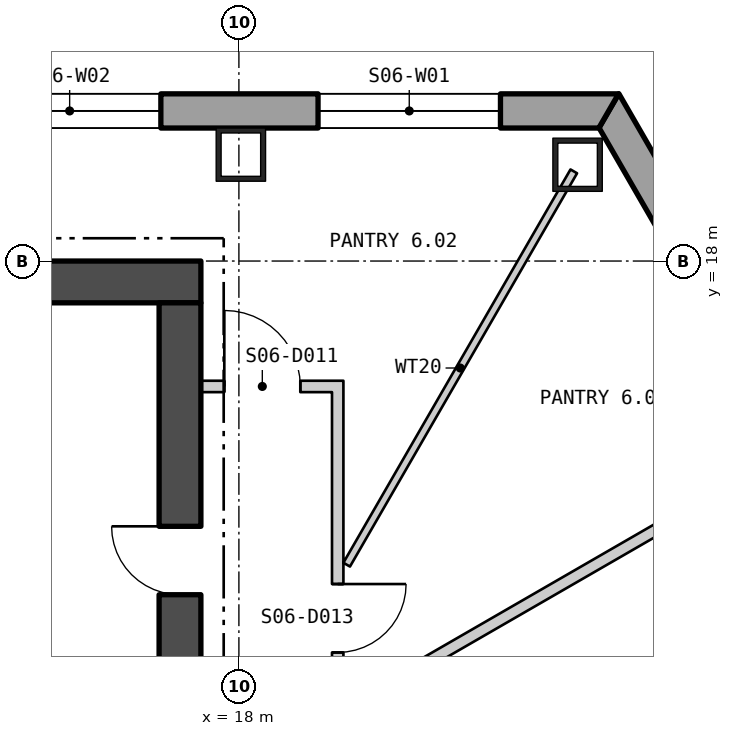
"""IFC4 building model, lengths in metres.
Left out: names, types, materials, properties, quantities, classifications, styles, units other than length and angle.
Written with IfcOpenShell. Run it as: python <this file> out.ifc"""

import sys

from ifc_helpers import new_model, si_unit, direction, frame, frame_2d, origin, origin_2d, place, context, subcontext, project, spatial, polyline, rectangle, hollow_rectangle, outline, extrude, element, fill, save


model = new_model("IFC4")
c1 = context("Model", 3, precision=1e-05, world=origin(), true_north=direction((0.0, 1.0)))
c2 = subcontext(c1, "Body", "Model", "MODEL_VIEW")
j1 = project(units=[si_unit("LENGTHUNIT", "METRE"), si_unit("PLANEANGLEUNIT", "RADIAN")], contexts=[c1])
p1 = place(None, origin())
s1 = spatial("IfcSite", under=j1, at=p1, CompositionType="ELEMENT")
p2 = place(p1, origin())
s2 = spatial("IfcBuilding", under=s1, at=p2, CompositionType="ELEMENT")
p3 = place(p2, frame((0.0, 0.0, 84.3)))
s3 = spatial("IfcBuildingStorey", under=s2, at=p3, CompositionType="ELEMENT", Elevation=84.3)
for number, where, z_axis, x_axis in (
    (1, (22.456, 19.267, 0.0), (0.0, 0.0, 1.0), (-1.0, 0.0, 0.0)),
    (2, (18.026, 19.4, 0.0), (0.0, 0.0, 1.0), (-1.0, 0.0, 0.0)),
):
    element("IfcColumn", number, at=place(p3, frame(where, z_axis=z_axis, x_axis=x_axis)), inside=s3, PredefinedType="COLUMN", context=c2, shape_type="SweptSolid", body=[
        extrude(hollow_rectangle(XDim=0.65, YDim=0.7, WallThickness=0.065, at=origin_2d()), origin(), (0.0, 0.0, 1.0), 4.5),
    ])
p4 = place(p3, frame((22.865, 19.975, -0.4), z_axis=(0.0, 0.0, 1.0), x_axis=(-1.0, 0.0, 0.0)))
e3 = element("IfcWall", 3, at=p4, inside=s3, PredefinedType="SOLIDWALL", context=c2, shape_type="SweptSolid", body=[
    extrude(outline(polyline([(-0.13, -0.225), (45.86, -0.225), (45.6, 0.225), (0.13, 0.225), (-0.13, -0.225)])), origin(), (0.0, 0.0, 1.0), 4.5),
])
p5 = place(p4, frame((1.424, 0.0, 1.3)))
e4 = element("IfcOpeningElement", 4, at=p5, cuts=e3, PredefinedType="OPENING", context=c2, shape_type="SweptSolid", body=[
    extrude(rectangle(XDim=2.4, YDim=2.6, at=frame_2d((1.2, 1.3))), frame((0.0, 0.235, 0.0), z_axis=(0.0, -1.0, 0.0), x_axis=(1.0, 0.0, 0.0)), (0.0, 0.0, 1.0), 0.47),
])
p6 = place(p4, frame((5.892, 0.0, 1.3)))
e5 = element("IfcOpeningElement", 5, at=p6, cuts=e3, PredefinedType="OPENING", context=c2, shape_type="SweptSolid", body=[
    extrude(rectangle(XDim=2.4, YDim=2.6, at=frame_2d((1.2, 1.3))), frame((0.0, 0.235, 0.0), z_axis=(0.0, -1.0, 0.0), x_axis=(1.0, 0.0, 0.0)), (0.0, 0.0, 1.0), 0.47),
])
p7 = place(p4, frame((10.399, 0.0, 1.3)))
e6 = element("IfcOpeningElement", 6, at=p7, cuts=e3, PredefinedType="OPENING", context=c2, shape_type="SweptSolid", body=[
    extrude(rectangle(XDim=2.4, YDim=2.6, at=frame_2d((1.2, 1.3))), frame((0.0, 0.235, 0.0), z_axis=(0.0, -1.0, 0.0), x_axis=(1.0, 0.0, 0.0)), (0.0, 0.0, 1.0), 0.47),
])
p8 = place(p4, frame((14.905, 0.0, 1.3)))
e7 = element("IfcOpeningElement", 7, at=p8, cuts=e3, PredefinedType="OPENING", context=c2, shape_type="SweptSolid", body=[
    extrude(rectangle(XDim=2.4, YDim=2.6, at=frame_2d((1.2, 1.3))), frame((0.0, 0.235, 0.0), z_axis=(0.0, -1.0, 0.0), x_axis=(1.0, 0.0, 0.0)), (0.0, 0.0, 1.0), 0.47),
])
p9 = place(p4, frame((19.412, 0.0, 1.3)))
e8 = element("IfcOpeningElement", 8, at=p9, cuts=e3, PredefinedType="OPENING", context=c2, shape_type="SweptSolid", body=[
    extrude(rectangle(XDim=2.4, YDim=2.6, at=frame_2d((1.2, 1.3))), frame((0.0, 0.235, 0.0), z_axis=(0.0, -1.0, 0.0), x_axis=(1.0, 0.0, 0.0)), (0.0, 0.0, 1.0), 0.47),
])
p10 = place(p4, frame((23.918, 0.0, 1.3)))
e9 = element("IfcOpeningElement", 9, at=p10, cuts=e3, PredefinedType="OPENING", context=c2, shape_type="SweptSolid", body=[
    extrude(rectangle(XDim=2.4, YDim=2.6, at=frame_2d((1.2, 1.3))), frame((0.0, 0.235, 0.0), z_axis=(0.0, -1.0, 0.0), x_axis=(1.0, 0.0, 0.0)), (0.0, 0.0, 1.0), 0.47),
])
p11 = place(p4, frame((28.425, 0.0, 1.3)))
e10 = element("IfcOpeningElement", 10, at=p11, cuts=e3, PredefinedType="OPENING", context=c2, shape_type="SweptSolid", body=[
    extrude(rectangle(XDim=2.4, YDim=2.6, at=frame_2d((1.2, 1.3))), frame((0.0, 0.235, 0.0), z_axis=(0.0, -1.0, 0.0), x_axis=(1.0, 0.0, 0.0)), (0.0, 0.0, 1.0), 0.47),
])
p12 = place(p4, frame((32.932, 0.0, 1.3)))
e11 = element("IfcOpeningElement", 11, at=p12, cuts=e3, PredefinedType="OPENING", context=c2, shape_type="SweptSolid", body=[
    extrude(rectangle(XDim=2.4, YDim=2.6, at=frame_2d((1.2, 1.3))), frame((0.0, 0.235, 0.0), z_axis=(0.0, -1.0, 0.0), x_axis=(1.0, 0.0, 0.0)), (0.0, 0.0, 1.0), 0.47),
])
p13 = place(p4, frame((37.438, 0.0, 1.3)))
e12 = element("IfcOpeningElement", 12, at=p13, cuts=e3, PredefinedType="OPENING", context=c2, shape_type="SweptSolid", body=[
    extrude(rectangle(XDim=2.4, YDim=2.6, at=frame_2d((1.2, 1.3))), frame((0.0, 0.235, 0.0), z_axis=(0.0, -1.0, 0.0), x_axis=(1.0, 0.0, 0.0)), (0.0, 0.0, 1.0), 0.47),
])
p14 = place(p4, frame((41.907, 0.0, 1.3)))
e13 = element("IfcOpeningElement", 13, at=p14, cuts=e3, PredefinedType="OPENING", context=c2, shape_type="SweptSolid", body=[
    extrude(rectangle(XDim=2.4, YDim=2.6, at=frame_2d((1.2, 1.3))), frame((0.0, 0.235, 0.0), z_axis=(0.0, -1.0, 0.0), x_axis=(1.0, 0.0, 0.0)), (0.0, 0.0, 1.0), 0.47),
])
p15 = place(p3, frame((27.954, 11.169, -0.4), z_axis=(0.0, 0.0, 1.0), x_axis=(-0.499997937663, 0.866026594472, 0.0)))
e14 = element("IfcWall", 14, at=p15, inside=s3, PredefinedType="SOLIDWALL", context=c2, shape_type="SweptSolid", body=[
    extrude(outline(polyline([(-0.13, -0.225), (10.3, -0.225), (10.04, 0.225), (0.13, 0.225), (-0.13, -0.225)])), origin(), (0.0, 0.0, 1.0), 4.5),
])
p16 = place(p15, frame((1.847, 0.0, 1.3)))
e15 = element("IfcOpeningElement", 15, at=p16, cuts=e14, PredefinedType="OPENING", context=c2, shape_type="SweptSolid", body=[
    extrude(rectangle(XDim=1.8, YDim=2.6, at=frame_2d((0.9, 1.3))), frame((0.0, 0.235, 0.0), z_axis=(0.0, -1.0, 0.0), x_axis=(1.0, 0.0, 0.0)), (0.0, 0.0, 1.0), 0.47),
])
p17 = place(p15, frame((6.523, 0.0, 1.3)))
e16 = element("IfcOpeningElement", 16, at=p17, cuts=e14, PredefinedType="OPENING", context=c2, shape_type="SweptSolid", body=[
    extrude(rectangle(XDim=1.8, YDim=2.6, at=frame_2d((0.9, 1.3))), frame((0.0, 0.235, 0.0), z_axis=(0.0, -1.0, 0.0), x_axis=(1.0, 0.0, 0.0)), (0.0, 0.0, 1.0), 0.47),
])
p18 = place(p3, frame((-17.5, 17.725, 0.0), z_axis=(0.0, 0.0, 1.0), x_axis=(1.0, 0.0, 0.0)))
e17 = element("IfcWall", 17, at=p18, inside=s3, PredefinedType="SHEAR", context=c2, shape_type="SweptSolid", body=[
    extrude(rectangle(XDim=35.0, YDim=0.55, at=frame_2d((17.5, 0.0))), origin(), (0.0, 0.0, 1.0), 4.3),
])
p19 = place(p3, frame((17.225, 0.55, 0.0), z_axis=(0.0, 0.0, 1.0), x_axis=(0.0, 1.0, 0.0)))
e18 = element("IfcWall", 18, at=p19, inside=s3, PredefinedType="SHEAR", context=c2, shape_type="SweptSolid", body=[
    extrude(rectangle(XDim=16.9, YDim=0.55, at=frame_2d((8.45, 0.0))), origin(), (0.0, 0.0, 1.0), 4.3),
])
p20 = place(p19, frame((5.75, 0.0, 0.0)))
e19 = element("IfcOpeningElement", 19, at=p20, cuts=e18, PredefinedType="OPENING", context=c2, shape_type="SweptSolid", body=[
    extrude(rectangle(XDim=1.5, YDim=2.1, at=frame_2d((0.75, 1.05))), frame((0.0, 0.285, 0.0), z_axis=(0.0, -1.0, 0.0), x_axis=(1.0, 0.0, 0.0)), (0.0, 0.0, 1.0), 0.57),
])
p21 = place(p19, frame((1.525, 0.0, 0.0)))
e20 = element("IfcOpeningElement", 20, at=p21, cuts=e18, PredefinedType="OPENING", context=c2, shape_type="SweptSolid", body=[
    extrude(rectangle(XDim=0.9, YDim=2.1, at=frame_2d((0.45, 1.05))), frame((0.0, 0.285, 0.0), z_axis=(0.0, -1.0, 0.0), x_axis=(1.0, 0.0, 0.0)), (0.0, 0.0, 1.0), 0.57),
])
p22 = place(p19, frame((4.4, 0.0, 0.0)))
e21 = element("IfcOpeningElement", 21, at=p22, cuts=e18, PredefinedType="OPENING", context=c2, shape_type="SweptSolid", body=[
    extrude(rectangle(XDim=0.9, YDim=2.1, at=frame_2d((0.45, 1.05))), frame((0.0, 0.285, 0.0), z_axis=(0.0, -1.0, 0.0), x_axis=(1.0, 0.0, 0.0)), (0.0, 0.0, 1.0), 0.57),
])
p23 = place(p19, frame((8.184, 0.0, 0.0)))
e22 = element("IfcOpeningElement", 22, at=p23, cuts=e18, PredefinedType="OPENING", context=c2, shape_type="SweptSolid", body=[
    extrude(rectangle(XDim=1.0, YDim=2.1, at=frame_2d((0.5, 1.05))), frame((0.0, 0.285, 0.0), z_axis=(0.0, -1.0, 0.0), x_axis=(1.0, 0.0, 0.0)), (0.0, 0.0, 1.0), 0.57),
])
p24 = place(p19, frame((13.059, 0.0, 0.0)))
e23 = element("IfcOpeningElement", 23, at=p24, cuts=e18, PredefinedType="OPENING", context=c2, shape_type="SweptSolid", body=[
    extrude(rectangle(XDim=0.9, YDim=2.1, at=frame_2d((0.45, 1.05))), frame((0.0, 0.285, 0.0), z_axis=(0.0, -1.0, 0.0), x_axis=(1.0, 0.0, 0.0)), (0.0, 0.0, 1.0), 0.57),
])
p25 = place(p3, frame((17.5, 16.35, 0.0), z_axis=(0.0, 0.0, 1.0), x_axis=(1.0, 0.0, 0.0)))
e24 = element("IfcWall", 24, at=p25, inside=s3, PredefinedType="PARTITIONING", context=c2, shape_type="SweptSolid", body=[
    extrude(rectangle(XDim=1.725, YDim=0.15, at=frame_2d((0.863, 0.0))), origin(), (0.0, 0.0, 1.0), 4.3),
])
p26 = place(p25, frame((0.308, 0.0, 0.0)))
e25 = element("IfcOpeningElement", 25, at=p26, cuts=e24, PredefinedType="OPENING", context=c2, shape_type="SweptSolid", body=[
    extrude(rectangle(XDim=1.0, YDim=2.1, at=frame_2d((0.5, 1.05))), frame((0.0, 0.085, 0.0), z_axis=(0.0, -1.0, 0.0), x_axis=(1.0, 0.0, 0.0)), (0.0, 0.0, 1.0), 0.17),
])
p27 = place(p3, frame((19.3, -1.875, 0.0), z_axis=(0.0, 0.0, 1.0), x_axis=(0.0, 1.0, 0.0)))
e26 = element("IfcWall", 26, at=p27, inside=s3, PredefinedType="PARTITIONING", context=c2, shape_type="SweptSolid", body=[
    extrude(rectangle(XDim=18.3, YDim=0.15, at=frame_2d((9.15, 0.0))), origin(), (0.0, 0.0, 1.0), 4.3),
])
p28 = place(p27, frame((9.958, 0.0, 0.0)))
e27 = element("IfcOpeningElement", 27, at=p28, cuts=e26, PredefinedType="OPENING", context=c2, shape_type="SweptSolid", body=[
    extrude(rectangle(XDim=1.0, YDim=2.1, at=frame_2d((0.5, 1.05))), frame((0.0, 0.085, 0.0), z_axis=(0.0, -1.0, 0.0), x_axis=(1.0, 0.0, 0.0)), (0.0, 0.0, 1.0), 0.17),
])
p29 = place(p27, frame((14.725, 0.0, 0.0)))
e28 = element("IfcOpeningElement", 28, at=p29, cuts=e26, PredefinedType="OPENING", context=c2, shape_type="SweptSolid", body=[
    extrude(rectangle(XDim=0.9, YDim=2.1, at=frame_2d((0.45, 1.05))), frame((0.0, 0.085, 0.0), z_axis=(0.0, -1.0, 0.0), x_axis=(1.0, 0.0, 0.0)), (0.0, 0.0, 1.0), 0.17),
])
p30 = place(p3, frame((19.412, 12.11, 0.0), z_axis=(0.0, 0.0, 1.0), x_axis=(0.866097636026, 0.499874869213, 0.0)))
e29 = element("IfcWall", 29, at=p30, inside=s3, PredefinedType="PARTITIONING", context=c2, shape_type="SweptSolid", body=[
    extrude(rectangle(XDim=6.248, YDim=0.15, at=frame_2d((3.124, 0.0))), origin(), (0.0, 0.0, 1.0), 4.3),
])
p31 = place(p3, frame((19.418, 14.005, 0.0), z_axis=(0.0, 0.0, 1.0), x_axis=(0.500026652407, 0.866010015463, 0.0)))
e30 = element("IfcWall", 30, at=p31, inside=s3, PredefinedType="PARTITIONING", context=c2, shape_type="SweptSolid", body=[
    extrude(rectangle(XDim=5.976, YDim=0.1, at=frame_2d((2.988, 0.0))), origin(), (0.0, 0.0, 1.0), 4.3),
])
p32 = place(p5, origin())
e31 = element("IfcWindow", 31, at=p32, inside=s3, PartitioningType="SINGLE_PANEL", PredefinedType="WINDOW", context=c2, shape_type="SweptSolid", body=[
    extrude(rectangle(XDim=2.4, YDim=2.6, at=frame_2d((1.2, 1.3))), frame((0.0, 0.105, 0.0), z_axis=(0.0, -1.0, 0.0), x_axis=(1.0, 0.0, 0.0)), (0.0, 0.0, 1.0), 0.06),
])
fill(e4, e31)
p33 = place(p6, origin())
e32 = element("IfcWindow", 32, at=p33, inside=s3, PartitioningType="SINGLE_PANEL", PredefinedType="WINDOW", context=c2, shape_type="SweptSolid", body=[
    extrude(rectangle(XDim=2.4, YDim=2.6, at=frame_2d((1.2, 1.3))), frame((0.0, 0.105, 0.0), z_axis=(0.0, -1.0, 0.0), x_axis=(1.0, 0.0, 0.0)), (0.0, 0.0, 1.0), 0.06),
])
fill(e5, e32)
p34 = place(p24, origin())
e33 = element("IfcDoor", 33, at=p34, inside=s3, OperationType="SINGLE_SWING_LEFT", PredefinedType="DOOR", context=c2, shape_type="SweptSolid", body=[
    extrude(rectangle(XDim=0.9, YDim=2.1, at=frame_2d((0.45, 1.05))), frame((0.0, 0.025, 0.0), z_axis=(0.0, -1.0, 0.0), x_axis=(1.0, 0.0, 0.0)), (0.0, 0.0, 1.0), 0.05),
])
fill(e23, e33)
p35 = place(p26, origin())
e34 = element("IfcDoor", 34, at=p35, inside=s3, OperationType="SINGLE_SWING_RIGHT", PredefinedType="DOOR", context=c2, shape_type="SweptSolid", body=[
    extrude(rectangle(XDim=1.0, YDim=2.1, at=frame_2d((0.5, 1.05))), frame((0.0, 0.025, 0.0), z_axis=(0.0, -1.0, 0.0), x_axis=(1.0, 0.0, 0.0)), (0.0, 0.0, 1.0), 0.05),
])
fill(e25, e34)
p36 = place(p29, origin())
e35 = element("IfcDoor", 35, at=p36, inside=s3, OperationType="SINGLE_SWING_RIGHT", PredefinedType="DOOR", context=c2, shape_type="SweptSolid", body=[
    extrude(rectangle(XDim=0.9, YDim=2.1, at=frame_2d((0.45, 1.05))), frame((0.0, 0.025, 0.0), z_axis=(0.0, -1.0, 0.0), x_axis=(1.0, 0.0, 0.0)), (0.0, 0.0, 1.0), 0.05),
])
fill(e28, e35)
save(model, sys.argv[1])
